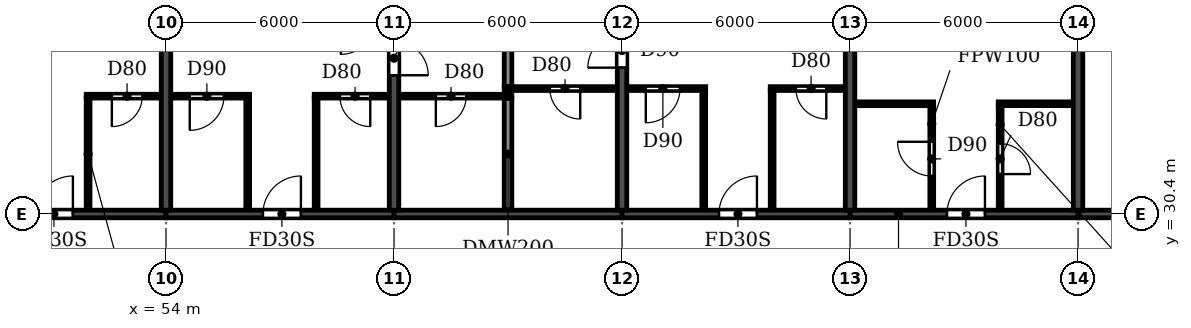
"""IFC4 building model, lengths in metres.
Left out: names, types, materials, properties, quantities, classifications, styles, units other than length and angle.
Written with IfcOpenShell. Run it as: python <this file> out.ifc"""

import sys

from ifc_helpers import new_model, si_unit, direction, frame, frame_2d, origin, place, context, subcontext, project, spatial, rectangle, extrude, element, fill, save


model = new_model("IFC4")
c1 = context("Model", 3, precision=1e-05, world=origin(), true_north=direction((0.0, 1.0)))
c2 = subcontext(c1, "Body", "Model", "MODEL_VIEW")
j1 = project(units=[si_unit("LENGTHUNIT", "METRE"), si_unit("PLANEANGLEUNIT", "RADIAN")], contexts=[c1])
p1 = place(None, origin())
s1 = spatial("IfcSite", under=j1, at=p1, CompositionType="ELEMENT")
p2 = place(p1, origin())
s2 = spatial("IfcBuilding", under=s1, at=p2, CompositionType="ELEMENT")
p3 = place(p2, frame((0.0, 0.0, 257.7)))
s3 = spatial("IfcBuildingStorey", under=s2, at=p3, CompositionType="ELEMENT", Elevation=257.7)
p4 = place(p3, frame((54.0, 30.5, 0.0), z_axis=(0.0, 0.0, 1.0), x_axis=(0.0, 1.0, 0.0)))
e1 = element("IfcWall", 1, at=p4, inside=s3, PredefinedType="SHEAR", context=c2, shape_type="SweptSolid", body=[
    extrude(rectangle(XDim=10.5, YDim=0.25, at=frame_2d((5.25, 0.0))), origin(), (0.0, 0.0, 1.0), 3.0),
])
p5 = place(p3, frame((60.0, 30.5, 0.0), z_axis=(0.0, 0.0, 1.0), x_axis=(0.0, 1.0, 0.0)))
e2 = element("IfcWall", 2, at=p5, inside=s3, PredefinedType="SHEAR", context=c2, shape_type="SweptSolid", body=[
    extrude(rectangle(XDim=10.5, YDim=0.25, at=frame_2d((5.25, 0.0))), origin(), (0.0, 0.0, 1.0), 3.0),
])
p6 = place(p5, frame((3.55, 0.0, 0.0)))
e3 = element("IfcOpeningElement", 3, at=p6, cuts=e2, PredefinedType="OPENING", context=c2, shape_type="SweptSolid", body=[
    extrude(rectangle(XDim=0.9, YDim=2.1, at=frame_2d((0.45, 1.05))), frame((0.0, 0.135, 0.0), z_axis=(0.0, -1.0, 0.0), x_axis=(1.0, 0.0, 0.0)), (0.0, 0.0, 1.0), 0.27),
])
p7 = place(p3, frame((66.0, 30.5, 0.0), z_axis=(0.0, 0.0, 1.0), x_axis=(0.0, 1.0, 0.0)))
e4 = element("IfcWall", 4, at=p7, inside=s3, PredefinedType="SHEAR", context=c2, shape_type="SweptSolid", body=[
    extrude(rectangle(XDim=10.5, YDim=0.25, at=frame_2d((5.25, 0.0))), origin(), (0.0, 0.0, 1.0), 3.0),
])
p8 = place(p7, frame((3.75, 0.0, 0.0)))
e5 = element("IfcOpeningElement", 5, at=p8, cuts=e4, PredefinedType="OPENING", context=c2, shape_type="SweptSolid", body=[
    extrude(rectangle(XDim=0.9, YDim=2.1, at=frame_2d((0.45, 1.05))), frame((0.0, 0.135, 0.0), z_axis=(0.0, -1.0, 0.0), x_axis=(1.0, 0.0, 0.0)), (0.0, 0.0, 1.0), 0.27),
])
p9 = place(p3, frame((72.0, 30.5, 0.0), z_axis=(0.0, 0.0, 1.0), x_axis=(0.0, 1.0, 0.0)))
e6 = element("IfcWall", 6, at=p9, inside=s3, PredefinedType="SHEAR", context=c2, shape_type="SweptSolid", body=[
    extrude(rectangle(XDim=10.5, YDim=0.25, at=frame_2d((5.25, 0.0))), origin(), (0.0, 0.0, 1.0), 2.1),
])
p10 = place(p3, frame((78.0, 30.5, 0.0), z_axis=(0.0, 0.0, 1.0), x_axis=(0.0, 1.0, 0.0)))
e7 = element("IfcWall", 7, at=p10, inside=s3, PredefinedType="SHEAR", context=c2, shape_type="SweptSolid", body=[
    extrude(rectangle(XDim=10.5, YDim=0.25, at=frame_2d((5.25, 0.0))), origin(), (0.0, 0.0, 1.0), 3.0),
])
p11 = place(p3, frame((48.0, 30.4, 0.0), z_axis=(0.0, 0.0, 1.0), x_axis=(1.0, 0.0, 0.0)))
e8 = element("IfcWall", 8, at=p11, inside=s3, PredefinedType="SHEAR", context=c2, shape_type="SweptSolid", body=[
    extrude(rectangle(XDim=6.0, YDim=0.2, at=frame_2d((3.0, 0.0))), origin(), (0.0, 0.0, 1.0), 2.4),
])
p12 = place(p11, frame((2.55, 0.0, 0.0)))
e9 = element("IfcOpeningElement", 9, at=p12, cuts=e8, PredefinedType="OPENING", context=c2, shape_type="SweptSolid", body=[
    extrude(rectangle(XDim=1.0, YDim=2.1, at=frame_2d((0.5, 1.05))), frame((0.0, 0.11, 0.0), z_axis=(0.0, -1.0, 0.0), x_axis=(1.0, 0.0, 0.0)), (0.0, 0.0, 1.0), 0.22),
])
p13 = place(p3, frame((54.0, 30.4, 0.0), z_axis=(0.0, 0.0, 1.0), x_axis=(1.0, 0.0, 0.0)))
e10 = element("IfcWall", 10, at=p13, inside=s3, PredefinedType="SHEAR", context=c2, shape_type="SweptSolid", body=[
    extrude(rectangle(XDim=6.0, YDim=0.2, at=frame_2d((3.0, 0.0))), origin(), (0.0, 0.0, 1.0), 2.4),
])
p14 = place(p13, frame((2.55, 0.0, 0.0)))
e11 = element("IfcOpeningElement", 11, at=p14, cuts=e10, PredefinedType="OPENING", context=c2, shape_type="SweptSolid", body=[
    extrude(rectangle(XDim=1.0, YDim=2.1, at=frame_2d((0.5, 1.05))), frame((0.0, 0.11, 0.0), z_axis=(0.0, -1.0, 0.0), x_axis=(1.0, 0.0, 0.0)), (0.0, 0.0, 1.0), 0.22),
])
p15 = place(p3, frame((60.0, 30.4, 0.0), z_axis=(0.0, 0.0, 1.0), x_axis=(1.0, 0.0, 0.0)))
e12 = element("IfcWall", 12, at=p15, inside=s3, PredefinedType="SHEAR", context=c2, shape_type="SweptSolid", body=[
    extrude(rectangle(XDim=6.0, YDim=0.2, at=frame_2d((3.0, 0.0))), origin(), (0.0, 0.0, 1.0), 2.4),
])
p16 = place(p3, frame((66.0, 30.4, 0.0), z_axis=(0.0, 0.0, 1.0), x_axis=(1.0, 0.0, 0.0)))
e13 = element("IfcWall", 13, at=p16, inside=s3, PredefinedType="SHEAR", context=c2, shape_type="SweptSolid", body=[
    extrude(rectangle(XDim=6.0, YDim=0.2, at=frame_2d((3.0, 0.0))), origin(), (0.0, 0.0, 1.0), 2.4),
])
p17 = place(p16, frame((2.55, 0.0, 0.0)))
e14 = element("IfcOpeningElement", 14, at=p17, cuts=e13, PredefinedType="OPENING", context=c2, shape_type="SweptSolid", body=[
    extrude(rectangle(XDim=1.0, YDim=2.1, at=frame_2d((0.5, 1.05))), frame((0.0, 0.11, 0.0), z_axis=(0.0, -1.0, 0.0), x_axis=(1.0, 0.0, 0.0)), (0.0, 0.0, 1.0), 0.22),
])
p18 = place(p3, frame((72.0, 30.4, 0.0), z_axis=(0.0, 0.0, 1.0), x_axis=(1.0, 0.0, 0.0)))
e15 = element("IfcWall", 15, at=p18, inside=s3, PredefinedType="SHEAR", context=c2, shape_type="SweptSolid", body=[
    extrude(rectangle(XDim=6.0, YDim=0.2, at=frame_2d((3.0, 0.0))), origin(), (0.0, 0.0, 1.0), 2.4),
])
p19 = place(p18, frame((2.55, 0.0, 0.0)))
e16 = element("IfcOpeningElement", 16, at=p19, cuts=e15, PredefinedType="OPENING", context=c2, shape_type="SweptSolid", body=[
    extrude(rectangle(XDim=1.0, YDim=2.1, at=frame_2d((0.5, 1.05))), frame((0.0, 0.11, 0.0), z_axis=(0.0, -1.0, 0.0), x_axis=(1.0, 0.0, 0.0)), (0.0, 0.0, 1.0), 0.22),
])
p20 = place(p3, frame((78.0, 30.4, 0.0), z_axis=(0.0, 0.0, 1.0), x_axis=(1.0, 0.0, 0.0)))
e17 = element("IfcWall", 17, at=p20, inside=s3, PredefinedType="SHEAR", context=c2, shape_type="SweptSolid", body=[
    extrude(rectangle(XDim=5.8, YDim=0.2, at=frame_2d((2.9, 0.0))), origin(), (0.0, 0.0, 1.0), 2.4),
])
p21 = place(p20, frame((2.5, 0.0, 0.0)))
e18 = element("IfcOpeningElement", 18, at=p21, cuts=e17, PredefinedType="OPENING", context=c2, shape_type="SweptSolid", body=[
    extrude(rectangle(XDim=1.0, YDim=2.1, at=frame_2d((0.5, 1.05))), frame((0.0, 0.11, 0.0), z_axis=(0.0, -1.0, 0.0), x_axis=(1.0, 0.0, 0.0)), (0.0, 0.0, 1.0), 0.22),
])
p22 = place(p3, frame((63.0, 30.51, 0.0), z_axis=(0.0, 0.0, 1.0), x_axis=(0.0, 1.0, 0.0)))
e19 = element("IfcWall", 19, at=p22, inside=s3, PredefinedType="PARTITIONING", context=c2, shape_type="SweptSolid", body=[
    extrude(rectangle(XDim=2.94, YDim=0.2, at=frame_2d((1.47, 0.0))), origin(), (0.0, 0.0, 1.0), 3.0),
])
p23 = place(p3, frame((63.0, 33.75, 0.0), z_axis=(0.0, 0.0, 1.0), x_axis=(0.0, 1.0, 0.0)))
e20 = element("IfcWall", 20, at=p23, inside=s3, PredefinedType="PARTITIONING", context=c2, shape_type="SweptSolid", body=[
    extrude(rectangle(XDim=7.39, YDim=0.2, at=frame_2d((3.695, 0.0))), origin(), (0.0, 0.0, 1.0), 3.0),
])
p24 = place(p3, frame((72.135, 33.3, 0.0), z_axis=(0.0, 0.0, 1.0), x_axis=(1.0, 0.0, 0.0)))
e21 = element("IfcWall", 21, at=p24, inside=s3, PredefinedType="PARTITIONING", context=c2, shape_type="SweptSolid", body=[
    extrude(rectangle(XDim=2.065, YDim=0.1, at=frame_2d((1.032, 0.0))), origin(), (0.0, 0.0, 1.0), 3.0),
])
p25 = place(p3, frame((75.9, 33.3, 0.0), z_axis=(0.0, 0.0, 1.0), x_axis=(1.0, 0.0, 0.0)))
e22 = element("IfcWall", 22, at=p25, inside=s3, PredefinedType="PARTITIONING", context=c2, shape_type="SweptSolid", body=[
    extrude(rectangle(XDim=1.965, YDim=0.1, at=frame_2d((0.982, 0.0))), origin(), (0.0, 0.0, 1.0), 3.0),
])
p26 = place(p3, frame((51.9, 33.5, 0.0), z_axis=(0.0, 0.0, 1.0), x_axis=(1.0, 0.0, 0.0)))
e23 = element("IfcWall", 23, at=p26, inside=s3, PredefinedType="PARTITIONING", context=c2, shape_type="SweptSolid", body=[
    extrude(rectangle(XDim=1.965, YDim=0.1, at=frame_2d((0.982, 0.0))), origin(), (0.0, 0.0, 1.0), 3.0),
])
p27 = place(p26, frame((0.675, 0.0, 0.0)))
e24 = element("IfcOpeningElement", 24, at=p27, cuts=e23, PredefinedType="OPENING", context=c2, shape_type="SweptSolid", body=[
    extrude(rectangle(XDim=0.8, YDim=2.1, at=frame_2d((0.4, 1.05))), frame((0.0, 0.06, 0.0), z_axis=(0.0, -1.0, 0.0), x_axis=(1.0, 0.0, 0.0)), (0.0, 0.0, 1.0), 0.12),
])
p28 = place(p3, frame((54.135, 33.5, 0.0), z_axis=(0.0, 0.0, 1.0), x_axis=(1.0, 0.0, 0.0)))
e25 = element("IfcWall", 25, at=p28, inside=s3, PredefinedType="PARTITIONING", context=c2, shape_type="SweptSolid", body=[
    extrude(rectangle(XDim=2.065, YDim=0.1, at=frame_2d((1.032, 0.0))), origin(), (0.0, 0.0, 1.0), 3.0),
])
p29 = place(p28, frame((0.49, 0.0, 0.0)))
e26 = element("IfcOpeningElement", 26, at=p29, cuts=e25, PredefinedType="OPENING", context=c2, shape_type="SweptSolid", body=[
    extrude(rectangle(XDim=0.9, YDim=2.1, at=frame_2d((0.45, 1.05))), frame((0.0, 0.06, 0.0), z_axis=(0.0, -1.0, 0.0), x_axis=(1.0, 0.0, 0.0)), (0.0, 0.0, 1.0), 0.12),
])
p30 = place(p3, frame((57.9, 33.5, 0.0), z_axis=(0.0, 0.0, 1.0), x_axis=(1.0, 0.0, 0.0)))
e27 = element("IfcWall", 27, at=p30, inside=s3, PredefinedType="PARTITIONING", context=c2, shape_type="SweptSolid", body=[
    extrude(rectangle(XDim=1.965, YDim=0.1, at=frame_2d((0.982, 0.0))), origin(), (0.0, 0.0, 1.0), 3.0),
])
p31 = place(p30, frame((0.675, 0.0, 0.0)))
e28 = element("IfcOpeningElement", 28, at=p31, cuts=e27, PredefinedType="OPENING", context=c2, shape_type="SweptSolid", body=[
    extrude(rectangle(XDim=0.8, YDim=2.1, at=frame_2d((0.4, 1.05))), frame((0.0, 0.06, 0.0), z_axis=(0.0, -1.0, 0.0), x_axis=(1.0, 0.0, 0.0)), (0.0, 0.0, 1.0), 0.12),
])
p32 = place(p3, frame((60.135, 33.5, 0.0), z_axis=(0.0, 0.0, 1.0), x_axis=(1.0, 0.0, 0.0)))
e29 = element("IfcWall", 29, at=p32, inside=s3, PredefinedType="PARTITIONING", context=c2, shape_type="SweptSolid", body=[
    extrude(rectangle(XDim=2.965, YDim=0.1, at=frame_2d((1.482, 0.0))), origin(), (0.0, 0.0, 1.0), 3.0),
])
p33 = place(p32, frame((0.965, 0.0, 0.0)))
e30 = element("IfcOpeningElement", 30, at=p33, cuts=e29, PredefinedType="OPENING", context=c2, shape_type="SweptSolid", body=[
    extrude(rectangle(XDim=0.8, YDim=2.1, at=frame_2d((0.4, 1.05))), frame((0.0, 0.06, 0.0), z_axis=(0.0, -1.0, 0.0), x_axis=(1.0, 0.0, 0.0)), (0.0, 0.0, 1.0), 0.12),
])
p34 = place(p3, frame((62.9, 33.7, 0.0), z_axis=(0.0, 0.0, 1.0), x_axis=(1.0, 0.0, 0.0)))
e31 = element("IfcWall", 31, at=p34, inside=s3, PredefinedType="PARTITIONING", context=c2, shape_type="SweptSolid", body=[
    extrude(rectangle(XDim=2.965, YDim=0.1, at=frame_2d((1.482, 0.0))), origin(), (0.0, 0.0, 1.0), 3.0),
])
p35 = place(p34, frame((1.2, 0.0, 0.0)))
e32 = element("IfcOpeningElement", 32, at=p35, cuts=e31, PredefinedType="OPENING", context=c2, shape_type="SweptSolid", body=[
    extrude(rectangle(XDim=0.8, YDim=2.1, at=frame_2d((0.4, 1.05))), frame((0.0, 0.06, 0.0), z_axis=(0.0, -1.0, 0.0), x_axis=(1.0, 0.0, 0.0)), (0.0, 0.0, 1.0), 0.12),
])
p36 = place(p3, frame((66.135, 33.7, 0.0), z_axis=(0.0, 0.0, 1.0), x_axis=(1.0, 0.0, 0.0)))
e33 = element("IfcWall", 33, at=p36, inside=s3, PredefinedType="PARTITIONING", context=c2, shape_type="SweptSolid", body=[
    extrude(rectangle(XDim=2.065, YDim=0.1, at=frame_2d((1.032, 0.0))), origin(), (0.0, 0.0, 1.0), 3.0),
])
p37 = place(p36, frame((0.49, 0.0, 0.0)))
e34 = element("IfcOpeningElement", 34, at=p37, cuts=e33, PredefinedType="OPENING", context=c2, shape_type="SweptSolid", body=[
    extrude(rectangle(XDim=0.9, YDim=2.1, at=frame_2d((0.45, 1.05))), frame((0.0, 0.06, 0.0), z_axis=(0.0, -1.0, 0.0), x_axis=(1.0, 0.0, 0.0)), (0.0, 0.0, 1.0), 0.12),
])
p38 = place(p3, frame((69.9, 33.7, 0.0), z_axis=(0.0, 0.0, 1.0), x_axis=(1.0, 0.0, 0.0)))
e35 = element("IfcWall", 35, at=p38, inside=s3, PredefinedType="PARTITIONING", context=c2, shape_type="SweptSolid", body=[
    extrude(rectangle(XDim=1.965, YDim=0.1, at=frame_2d((0.982, 0.0))), origin(), (0.0, 0.0, 1.0), 3.0),
])
p39 = place(p38, frame((0.675, 0.0, 0.0)))
e36 = element("IfcOpeningElement", 36, at=p39, cuts=e35, PredefinedType="OPENING", context=c2, shape_type="SweptSolid", body=[
    extrude(rectangle(XDim=0.8, YDim=2.1, at=frame_2d((0.4, 1.05))), frame((0.0, 0.06, 0.0), z_axis=(0.0, -1.0, 0.0), x_axis=(1.0, 0.0, 0.0)), (0.0, 0.0, 1.0), 0.12),
])
for number, where, z_axis, x_axis in (
    (37, (51.95, 30.51, 0.0), (0.0, 0.0, 1.0), (0.0, 1.0, 0.0)),
    (38, (56.15, 30.51, 0.0), (0.0, 0.0, 1.0), (0.0, 1.0, 0.0)),
    (39, (57.95, 30.51, 0.0), (0.0, 0.0, 1.0), (0.0, 1.0, 0.0)),
):
    element("IfcWall", number, at=place(p3, frame(where, z_axis=z_axis, x_axis=x_axis)), inside=s3, PredefinedType="PARTITIONING", context=c2, shape_type="SweptSolid", body=[
        extrude(rectangle(XDim=2.94, YDim=0.1, at=frame_2d((1.47, 0.0))), origin(), (0.0, 0.0, 1.0), 3.0),
    ])
for number, where, z_axis, x_axis in (
    (40, (68.15, 30.51, 0.0), (0.0, 0.0, 1.0), (0.0, 1.0, 0.0)),
    (41, (69.95, 30.51, 0.0), (0.0, 0.0, 1.0), (0.0, 1.0, 0.0)),
):
    element("IfcWall", number, at=place(p3, frame(where, z_axis=z_axis, x_axis=x_axis)), inside=s3, PredefinedType="PARTITIONING", context=c2, shape_type="SweptSolid", body=[
        extrude(rectangle(XDim=3.14, YDim=0.1, at=frame_2d((1.57, 0.0))), origin(), (0.0, 0.0, 1.0), 3.0),
    ])
p40 = place(p3, frame((74.15, 30.51, 0.0), z_axis=(0.0, 0.0, 1.0), x_axis=(0.0, 1.0, 0.0)))
e42 = element("IfcWall", 42, at=p40, inside=s3, PredefinedType="PARTITIONING", context=c2, shape_type="SweptSolid", body=[
    extrude(rectangle(XDim=2.74, YDim=0.1, at=frame_2d((1.37, 0.0))), origin(), (0.0, 0.0, 1.0), 3.0),
])
p41 = place(p40, frame((0.89, 0.0, 0.0)))
e43 = element("IfcOpeningElement", 43, at=p41, cuts=e42, PredefinedType="OPENING", context=c2, shape_type="SweptSolid", body=[
    extrude(rectangle(XDim=0.9, YDim=2.1, at=frame_2d((0.45, 1.05))), frame((0.0, 0.06, 0.0), z_axis=(0.0, -1.0, 0.0), x_axis=(1.0, 0.0, 0.0)), (0.0, 0.0, 1.0), 0.12),
])
p42 = place(p3, frame((75.95, 30.51, 0.0), z_axis=(0.0, 0.0, 1.0), x_axis=(0.0, 1.0, 0.0)))
e44 = element("IfcWall", 44, at=p42, inside=s3, PredefinedType="PARTITIONING", context=c2, shape_type="SweptSolid", body=[
    extrude(rectangle(XDim=2.74, YDim=0.1, at=frame_2d((1.37, 0.0))), origin(), (0.0, 0.0, 1.0), 3.0),
])
p43 = place(p42, frame((0.94, 0.0, 0.0)))
e45 = element("IfcOpeningElement", 45, at=p43, cuts=e44, PredefinedType="OPENING", context=c2, shape_type="SweptSolid", body=[
    extrude(rectangle(XDim=0.8, YDim=2.1, at=frame_2d((0.4, 1.05))), frame((0.0, 0.06, 0.0), z_axis=(0.0, -1.0, 0.0), x_axis=(1.0, 0.0, 0.0)), (0.0, 0.0, 1.0), 0.12),
])
p44 = place(p12, origin())
e46 = element("IfcDoor", 46, at=p44, inside=s3, OperationType="SINGLE_SWING_RIGHT", PredefinedType="DOOR", context=c2, shape_type="SweptSolid", body=[
    extrude(rectangle(XDim=1.0, YDim=2.1, at=frame_2d((0.5, 1.05))), frame((0.0, 0.025, 0.0), z_axis=(0.0, -1.0, 0.0), x_axis=(1.0, 0.0, 0.0)), (0.0, 0.0, 1.0), 0.05),
])
fill(e9, e46)
p45 = place(p27, frame((0.8, 0.0, 0.0), z_axis=(0.0, 0.0, 1.0), x_axis=(-1.0, 0.0, 0.0)))
e47 = element("IfcDoor", 47, at=p45, inside=s3, OperationType="SINGLE_SWING_RIGHT", PredefinedType="DOOR", context=c2, shape_type="SweptSolid", body=[
    extrude(rectangle(XDim=0.8, YDim=2.1, at=frame_2d((0.4, 1.05))), frame((0.0, 0.025, 0.0), z_axis=(0.0, -1.0, 0.0), x_axis=(1.0, 0.0, 0.0)), (0.0, 0.0, 1.0), 0.05),
])
fill(e24, e47)
p46 = place(p33, frame((0.8, 0.0, 0.0), z_axis=(0.0, 0.0, 1.0), x_axis=(-1.0, 0.0, 0.0)))
e48 = element("IfcDoor", 48, at=p46, inside=s3, OperationType="SINGLE_SWING_RIGHT", PredefinedType="DOOR", context=c2, shape_type="SweptSolid", body=[
    extrude(rectangle(XDim=0.8, YDim=2.1, at=frame_2d((0.4, 1.05))), frame((0.0, 0.025, 0.0), z_axis=(0.0, -1.0, 0.0), x_axis=(1.0, 0.0, 0.0)), (0.0, 0.0, 1.0), 0.05),
])
fill(e30, e48)
p47 = place(p29, frame((0.9, 0.0, 0.0), z_axis=(0.0, 0.0, 1.0), x_axis=(-1.0, 0.0, 0.0)))
e49 = element("IfcDoor", 49, at=p47, inside=s3, OperationType="SINGLE_SWING_RIGHT", PredefinedType="DOOR", context=c2, shape_type="SweptSolid", body=[
    extrude(rectangle(XDim=0.9, YDim=2.1, at=frame_2d((0.45, 1.05))), frame((0.0, 0.025, 0.0), z_axis=(0.0, -1.0, 0.0), x_axis=(1.0, 0.0, 0.0)), (0.0, 0.0, 1.0), 0.05),
])
fill(e26, e49)
p48 = place(p14, origin())
e50 = element("IfcDoor", 50, at=p48, inside=s3, OperationType="SINGLE_SWING_RIGHT", PredefinedType="DOOR", context=c2, shape_type="SweptSolid", body=[
    extrude(rectangle(XDim=1.0, YDim=2.1, at=frame_2d((0.5, 1.05))), frame((0.0, 0.025, 0.0), z_axis=(0.0, -1.0, 0.0), x_axis=(1.0, 0.0, 0.0)), (0.0, 0.0, 1.0), 0.05),
])
fill(e11, e50)
p49 = place(p31, frame((0.8, 0.0, 0.0), z_axis=(0.0, 0.0, 1.0), x_axis=(-1.0, 0.0, 0.0)))
e51 = element("IfcDoor", 51, at=p49, inside=s3, OperationType="SINGLE_SWING_LEFT", PredefinedType="DOOR", context=c2, shape_type="SweptSolid", body=[
    extrude(rectangle(XDim=0.8, YDim=2.1, at=frame_2d((0.4, 1.05))), frame((0.0, 0.025, 0.0), z_axis=(0.0, -1.0, 0.0), x_axis=(1.0, 0.0, 0.0)), (0.0, 0.0, 1.0), 0.05),
])
fill(e28, e51)
p50 = place(p6, frame((0.9, 0.0, 0.0), z_axis=(0.0, 0.0, 1.0), x_axis=(-1.0, 0.0, 0.0)))
e52 = element("IfcDoor", 52, at=p50, inside=s3, OperationType="SINGLE_SWING_RIGHT", PredefinedType="DOOR", context=c2, shape_type="SweptSolid", body=[
    extrude(rectangle(XDim=0.9, YDim=2.1, at=frame_2d((0.45, 1.05))), frame((0.0, 0.025, 0.0), z_axis=(0.0, -1.0, 0.0), x_axis=(1.0, 0.0, 0.0)), (0.0, 0.0, 1.0), 0.05),
])
fill(e3, e52)
p51 = place(p35, frame((0.8, 0.0, 0.0), z_axis=(0.0, 0.0, 1.0), x_axis=(-1.0, 0.0, 0.0)))
e53 = element("IfcDoor", 53, at=p51, inside=s3, OperationType="SINGLE_SWING_LEFT", PredefinedType="DOOR", context=c2, shape_type="SweptSolid", body=[
    extrude(rectangle(XDim=0.8, YDim=2.1, at=frame_2d((0.4, 1.05))), frame((0.0, 0.025, 0.0), z_axis=(0.0, -1.0, 0.0), x_axis=(1.0, 0.0, 0.0)), (0.0, 0.0, 1.0), 0.05),
])
fill(e32, e53)
p52 = place(p8, origin())
e54 = element("IfcDoor", 54, at=p52, inside=s3, OperationType="SINGLE_SWING_LEFT", PredefinedType="DOOR", context=c2, shape_type="SweptSolid", body=[
    extrude(rectangle(XDim=0.9, YDim=2.1, at=frame_2d((0.45, 1.05))), frame((0.0, 0.025, 0.0), z_axis=(0.0, -1.0, 0.0), x_axis=(1.0, 0.0, 0.0)), (0.0, 0.0, 1.0), 0.05),
])
fill(e5, e54)
p53 = place(p37, frame((0.9, 0.0, 0.0), z_axis=(0.0, 0.0, 1.0), x_axis=(-1.0, 0.0, 0.0)))
e55 = element("IfcDoor", 55, at=p53, inside=s3, OperationType="SINGLE_SWING_RIGHT", PredefinedType="DOOR", context=c2, shape_type="SweptSolid", body=[
    extrude(rectangle(XDim=0.9, YDim=2.1, at=frame_2d((0.45, 1.05))), frame((0.0, 0.025, 0.0), z_axis=(0.0, -1.0, 0.0), x_axis=(1.0, 0.0, 0.0)), (0.0, 0.0, 1.0), 0.05),
])
fill(e34, e55)
p54 = place(p17, origin())
e56 = element("IfcDoor", 56, at=p54, inside=s3, OperationType="SINGLE_SWING_RIGHT", PredefinedType="DOOR", context=c2, shape_type="SweptSolid", body=[
    extrude(rectangle(XDim=1.0, YDim=2.1, at=frame_2d((0.5, 1.05))), frame((0.0, 0.025, 0.0), z_axis=(0.0, -1.0, 0.0), x_axis=(1.0, 0.0, 0.0)), (0.0, 0.0, 1.0), 0.05),
])
fill(e14, e56)
p55 = place(p39, frame((0.8, 0.0, 0.0), z_axis=(0.0, 0.0, 1.0), x_axis=(-1.0, 0.0, 0.0)))
e57 = element("IfcDoor", 57, at=p55, inside=s3, OperationType="SINGLE_SWING_LEFT", PredefinedType="DOOR", context=c2, shape_type="SweptSolid", body=[
    extrude(rectangle(XDim=0.8, YDim=2.1, at=frame_2d((0.4, 1.05))), frame((0.0, 0.025, 0.0), z_axis=(0.0, -1.0, 0.0), x_axis=(1.0, 0.0, 0.0)), (0.0, 0.0, 1.0), 0.05),
])
fill(e36, e57)
p56 = place(p41, origin())
e58 = element("IfcDoor", 58, at=p56, inside=s3, OperationType="SINGLE_SWING_RIGHT", PredefinedType="DOOR", context=c2, shape_type="SweptSolid", body=[
    extrude(rectangle(XDim=0.9, YDim=2.1, at=frame_2d((0.45, 1.05))), frame((0.0, 0.025, 0.0), z_axis=(0.0, -1.0, 0.0), x_axis=(1.0, 0.0, 0.0)), (0.0, 0.0, 1.0), 0.05),
])
fill(e43, e58)
p57 = place(p19, origin())
e59 = element("IfcDoor", 59, at=p57, inside=s3, OperationType="SINGLE_SWING_RIGHT", PredefinedType="DOOR", context=c2, shape_type="SweptSolid", body=[
    extrude(rectangle(XDim=1.0, YDim=2.1, at=frame_2d((0.5, 1.05))), frame((0.0, 0.025, 0.0), z_axis=(0.0, -1.0, 0.0), x_axis=(1.0, 0.0, 0.0)), (0.0, 0.0, 1.0), 0.05),
])
fill(e16, e59)
p58 = place(p43, frame((0.8, 0.0, 0.0), z_axis=(0.0, 0.0, 1.0), x_axis=(-1.0, 0.0, 0.0)))
e60 = element("IfcDoor", 60, at=p58, inside=s3, OperationType="SINGLE_SWING_RIGHT", PredefinedType="DOOR", context=c2, shape_type="SweptSolid", body=[
    extrude(rectangle(XDim=0.8, YDim=2.1, at=frame_2d((0.4, 1.05))), frame((0.0, 0.025, 0.0), z_axis=(0.0, -1.0, 0.0), x_axis=(1.0, 0.0, 0.0)), (0.0, 0.0, 1.0), 0.05),
])
fill(e45, e60)
save(model, sys.argv[1])
